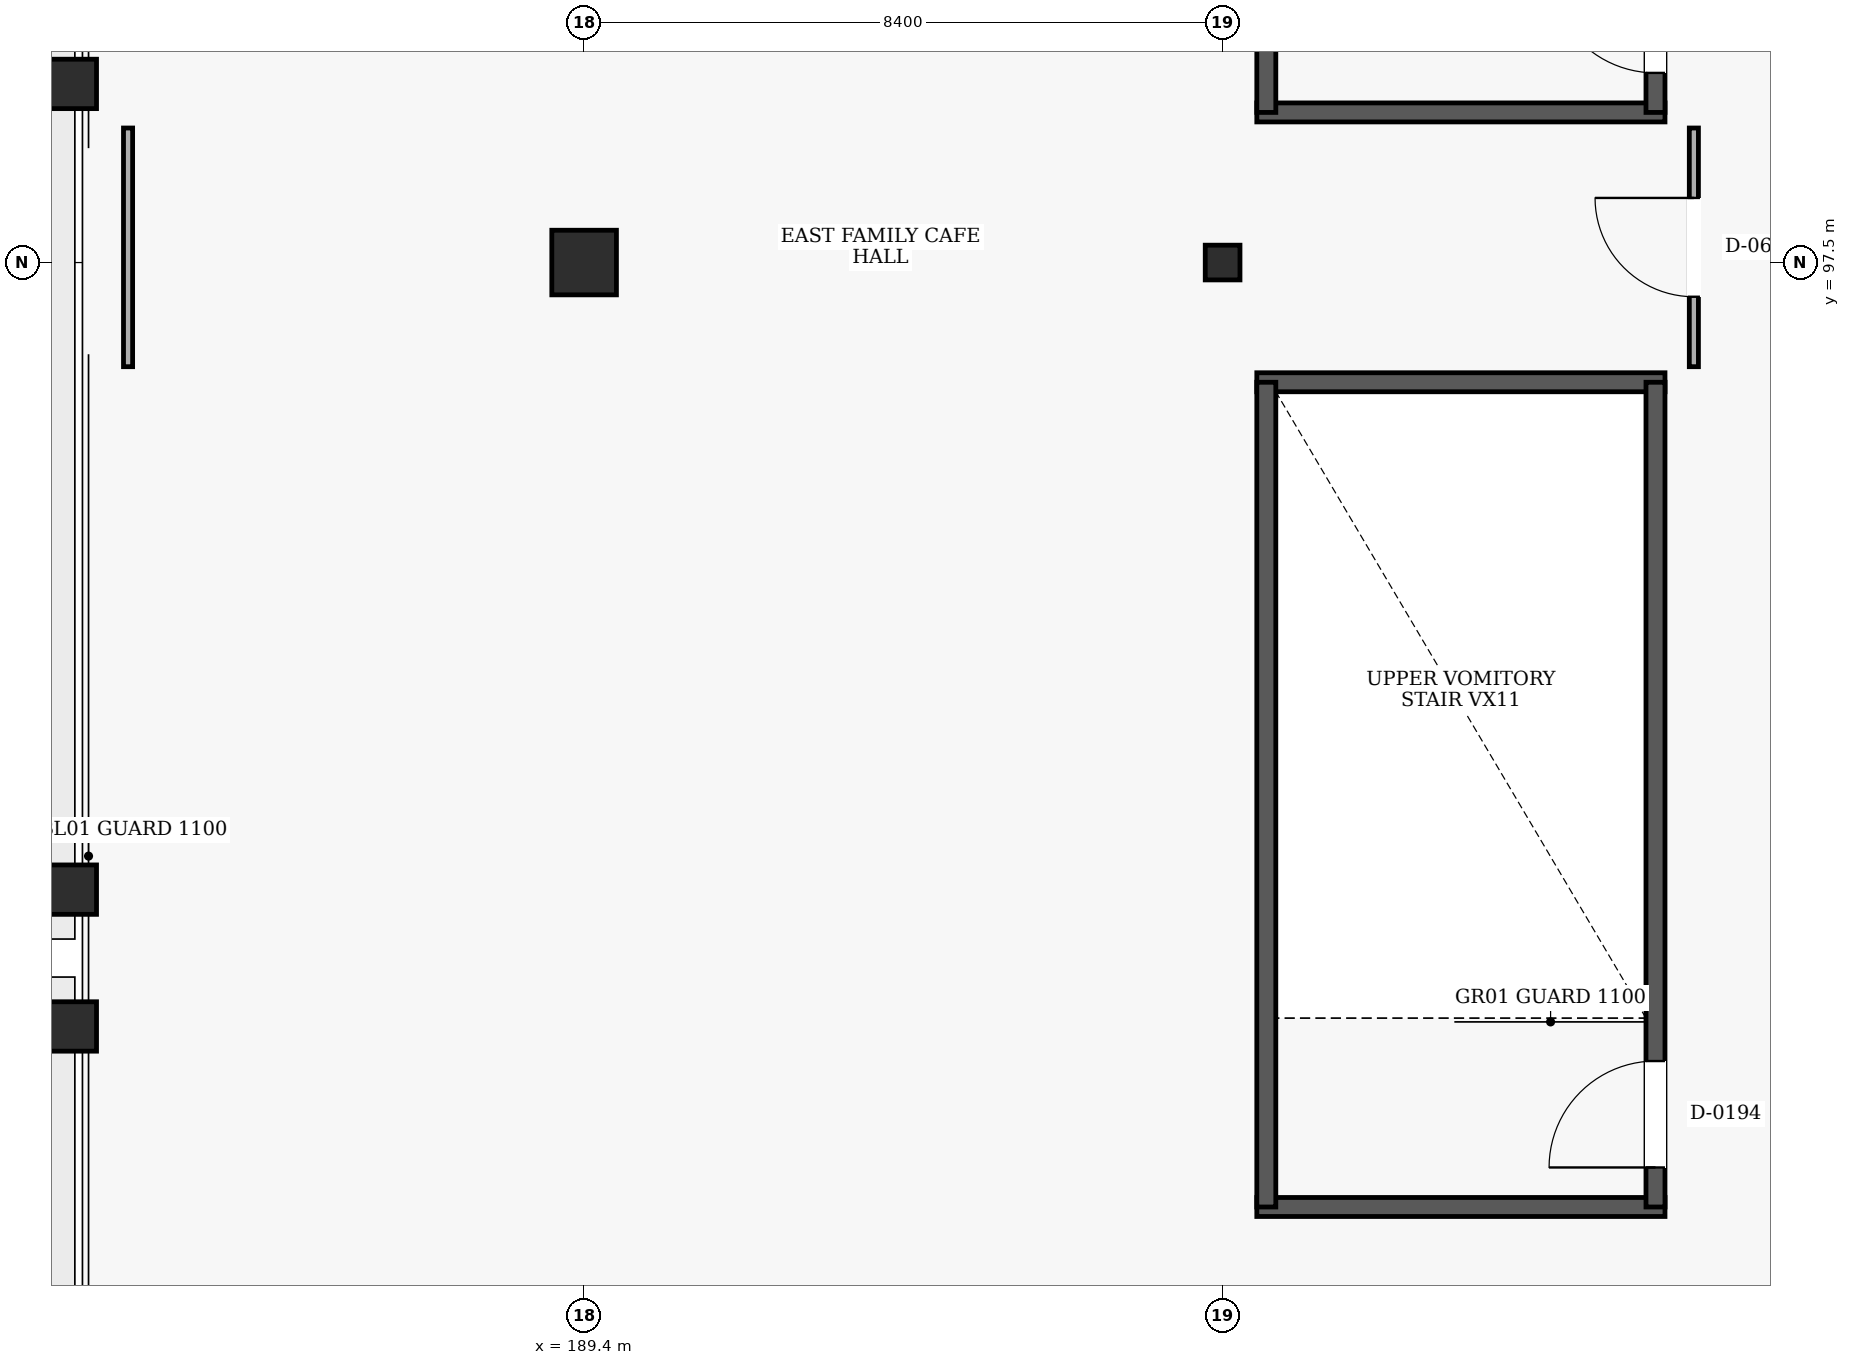
"""IFC4 building model, lengths in metres.
Left out: names, types, materials, properties, quantities, classifications, styles, units other than length and angle.
Written with IfcOpenShell. Run it as: python <this file> out.ifc"""

import sys

from ifc_helpers import new_model, si_unit, direction, frame, frame_2d, origin, origin_2d, place, context, subcontext, project, spatial, rectangle, hollow_circle, extrude, element, fill, save


model = new_model("IFC4")
c1 = context("Model", 3, precision=1e-05, world=origin(), true_north=direction((0.0, 1.0)))
c2 = subcontext(c1, "Body", "Model", "MODEL_VIEW")
j1 = project(units=[si_unit("LENGTHUNIT", "METRE"), si_unit("PLANEANGLEUNIT", "RADIAN")], contexts=[c1])
p1 = place(None, origin())
s1 = spatial("IfcSite", under=j1, at=p1, CompositionType="ELEMENT")
p2 = place(p1, origin())
s2 = spatial("IfcBuilding", under=s1, at=p2, CompositionType="ELEMENT")
p3 = place(p2, frame((0.0, 0.0, 15.0)))
s3 = spatial("IfcBuildingStorey", under=s2, at=p3, CompositionType="ELEMENT", Elevation=15.0)
p4 = place(p3, frame((189.4, 97.5, 0.0), z_axis=(0.0, 0.0, 1.0), x_axis=(1.0, 0.0, 0.0)))
e1 = element("IfcColumn", 1, at=p4, inside=s3, PredefinedType="COLUMN", context=c2, shape_type="SweptSolid", body=[
    extrude(rectangle(XDim=0.85, YDim=0.85, at=origin_2d()), origin(), (0.0, 0.0, 1.0), 4.8),
])
p5 = place(p3, frame((197.8, 97.5, 0.0), z_axis=(0.0, 0.0, 1.0), x_axis=(1.0, 0.0, 0.0)))
e2 = element("IfcColumn", 2, at=p5, inside=s3, PredefinedType="COLUMN", context=c2, shape_type="SweptSolid", body=[
    extrude(hollow_circle(Radius=0.229, WallThickness=0.02, at=origin_2d()), origin(), (0.0, 0.0, 1.0), 4.8),
])
for number, where, z_axis, x_axis in (
    (3, (182.66, 87.45, 0.0), (0.0, 0.0, 1.0), (1.0, 0.0, 0.0)),
    (4, (182.66, 89.25, 0.0), (0.0, 0.0, 1.0), (1.0, 0.0, 0.0)),
    (5, (182.66, 99.85, 0.0), (0.0, 0.0, 1.0), (1.0, 0.0, 0.0)),
):
    element("IfcColumn", number, at=place(p3, frame(where, z_axis=z_axis, x_axis=x_axis)), inside=s3, PredefinedType="COLUMN", context=c2, shape_type="SweptSolid", body=[
        extrude(rectangle(XDim=0.65, YDim=0.65, at=origin_2d()), origin(), (0.0, 0.0, 1.0), 2.188),
    ])
for number, where, z_axis, x_axis in (
    (6, (198.25, 85.075, 0.0), (0.0, 0.0, 1.0), (1.0, 0.0, 0.0)),
    (7, (203.62, 95.925, 0.0), (0.0, 0.0, 1.0), (-1.0, 0.0, 0.0)),
):
    element("IfcWall", number, at=place(p3, frame(where, z_axis=z_axis, x_axis=x_axis)), inside=s3, PredefinedType="SHEAR", context=c2, shape_type="SweptSolid", body=[
        extrude(rectangle(XDim=5.37, YDim=0.25, at=frame_2d((2.685, 0.0))), origin(), (0.0, 0.0, 1.0), 4.5),
    ])
p6 = place(p3, frame((198.375, 85.075, 0.0), z_axis=(0.0, 0.0, 1.0), x_axis=(0.0, 1.0, 0.0)))
e8 = element("IfcWall", 8, at=p6, inside=s3, PredefinedType="SHEAR", context=c2, shape_type="SweptSolid", body=[
    extrude(rectangle(XDim=10.85, YDim=0.25, at=frame_2d((5.425, 0.0))), origin(), (0.0, 0.0, 1.0), 4.5),
])
p7 = place(p3, frame((203.495, 85.075, 0.0), z_axis=(0.0, 0.0, 1.0), x_axis=(0.0, 1.0, 0.0)))
e9 = element("IfcWall", 9, at=p7, inside=s3, PredefinedType="SHEAR", context=c2, shape_type="SweptSolid", body=[
    extrude(rectangle(XDim=10.85, YDim=0.25, at=frame_2d((5.425, 0.0))), origin(), (0.0, 0.0, 1.0), 4.5),
])
p8 = place(p7, frame((0.52, 0.0, 0.0)))
e10 = element("IfcOpeningElement", 10, at=p8, cuts=e9, PredefinedType="OPENING", context=c2, shape_type="SweptSolid", body=[
    extrude(rectangle(XDim=1.4, YDim=2.15, at=frame_2d((0.7, 1.075))), frame((0.0, 0.135, 0.0), z_axis=(0.0, -1.0, 0.0), x_axis=(1.0, 0.0, 0.0)), (0.0, 0.0, 1.0), 0.27),
])
p9 = place(p3, frame((198.25, 99.475, 0.0), z_axis=(0.0, 0.0, 1.0), x_axis=(1.0, 0.0, 0.0)))
e11 = element("IfcWall", 11, at=p9, inside=s3, PredefinedType="SHEAR", context=c2, shape_type="SweptSolid", body=[
    extrude(rectangle(XDim=5.37, YDim=0.25, at=frame_2d((2.685, 0.0))), origin(), (0.0, 0.0, 1.0), 4.5),
])
p10 = place(p3, frame((198.375, 99.475, 0.0), z_axis=(0.0, 0.0, 1.0), x_axis=(0.0, 1.0, 0.0)))
e12 = element("IfcWall", 12, at=p10, inside=s3, PredefinedType="SHEAR", context=c2, shape_type="SweptSolid", body=[
    extrude(rectangle(XDim=10.85, YDim=0.25, at=frame_2d((5.425, 0.0))), origin(), (0.0, 0.0, 1.0), 4.5),
])
p11 = place(p3, frame((203.495, 99.475, 0.0), z_axis=(0.0, 0.0, 1.0), x_axis=(0.0, 1.0, 0.0)))
e13 = element("IfcWall", 13, at=p11, inside=s3, PredefinedType="SHEAR", context=c2, shape_type="SweptSolid", body=[
    extrude(rectangle(XDim=10.85, YDim=0.25, at=frame_2d((5.425, 0.0))), origin(), (0.0, 0.0, 1.0), 4.5),
])
p12 = place(p11, frame((0.52, 0.0, 0.0)))
e14 = element("IfcOpeningElement", 14, at=p12, cuts=e13, PredefinedType="OPENING", context=c2, shape_type="SweptSolid", body=[
    extrude(rectangle(XDim=1.4, YDim=2.15, at=frame_2d((0.7, 1.075))), frame((0.0, 0.135, 0.0), z_axis=(0.0, -1.0, 0.0), x_axis=(1.0, 0.0, 0.0)), (0.0, 0.0, 1.0), 0.27),
])
p13 = place(p3, frame((204.0, 96.13, 0.0), z_axis=(0.0, 0.0, 1.0), x_axis=(0.0, 1.0, 0.0)))
e15 = element("IfcWall", 15, at=p13, inside=s3, PredefinedType="PARTITIONING", context=c2, shape_type="SweptSolid", body=[
    extrude(rectangle(XDim=3.14, YDim=0.12, at=frame_2d((1.57, 0.0))), origin(), (0.0, 0.0, 1.0), 4.5),
])
p14 = place(p13, frame((0.92, 0.0, 0.0)))
e16 = element("IfcOpeningElement", 16, at=p14, cuts=e15, PredefinedType="OPENING", context=c2, shape_type="SweptSolid", body=[
    extrude(rectangle(XDim=1.3, YDim=2.2, at=frame_2d((0.65, 1.1))), frame((0.0, 0.07, 0.0), z_axis=(0.0, -1.0, 0.0), x_axis=(1.0, 0.0, 0.0)), (0.0, 0.0, 1.0), 0.14),
])
p15 = place(p3, frame((183.4, 99.27, 0.0), z_axis=(0.0, 0.0, 1.0), x_axis=(0.0, -1.0, 0.0)))
e17 = element("IfcWall", 17, at=p15, inside=s3, PredefinedType="PARTITIONING", context=c2, shape_type="SweptSolid", body=[
    extrude(rectangle(XDim=3.14, YDim=0.12, at=frame_2d((1.57, 0.0))), origin(), (0.0, 0.0, 1.0), 4.5),
])
p16 = place(p8, origin())
e18 = element("IfcDoor", 18, at=p16, inside=s3, OperationType="SINGLE_SWING_LEFT", PredefinedType="DOOR", context=c2, shape_type="SweptSolid", body=[
    extrude(rectangle(XDim=1.4, YDim=2.15, at=frame_2d((0.7, 1.075))), frame((0.0, 0.025, 0.0), z_axis=(0.0, -1.0, 0.0), x_axis=(1.0, 0.0, 0.0)), (0.0, 0.0, 1.0), 0.05),
])
fill(e10, e18)
p17 = place(p12, origin())
e19 = element("IfcDoor", 19, at=p17, inside=s3, OperationType="SINGLE_SWING_RIGHT", PredefinedType="DOOR", context=c2, shape_type="SweptSolid", body=[
    extrude(rectangle(XDim=1.4, YDim=2.15, at=frame_2d((0.7, 1.075))), frame((0.0, 0.025, 0.0), z_axis=(0.0, -1.0, 0.0), x_axis=(1.0, 0.0, 0.0)), (0.0, 0.0, 1.0), 0.05),
])
fill(e14, e19)
p18 = place(p14, origin())
e20 = element("IfcDoor", 20, at=p18, inside=s3, OperationType="SINGLE_SWING_RIGHT", PredefinedType="DOOR", context=c2, shape_type="SweptSolid", body=[
    extrude(rectangle(XDim=1.3, YDim=2.2, at=frame_2d((0.65, 1.1))), frame((0.0, 0.025, 0.0), z_axis=(0.0, -1.0, 0.0), x_axis=(1.0, 0.0, 0.0)), (0.0, 0.0, 1.0), 0.05),
])
fill(e16, e20)
save(model, sys.argv[1])
